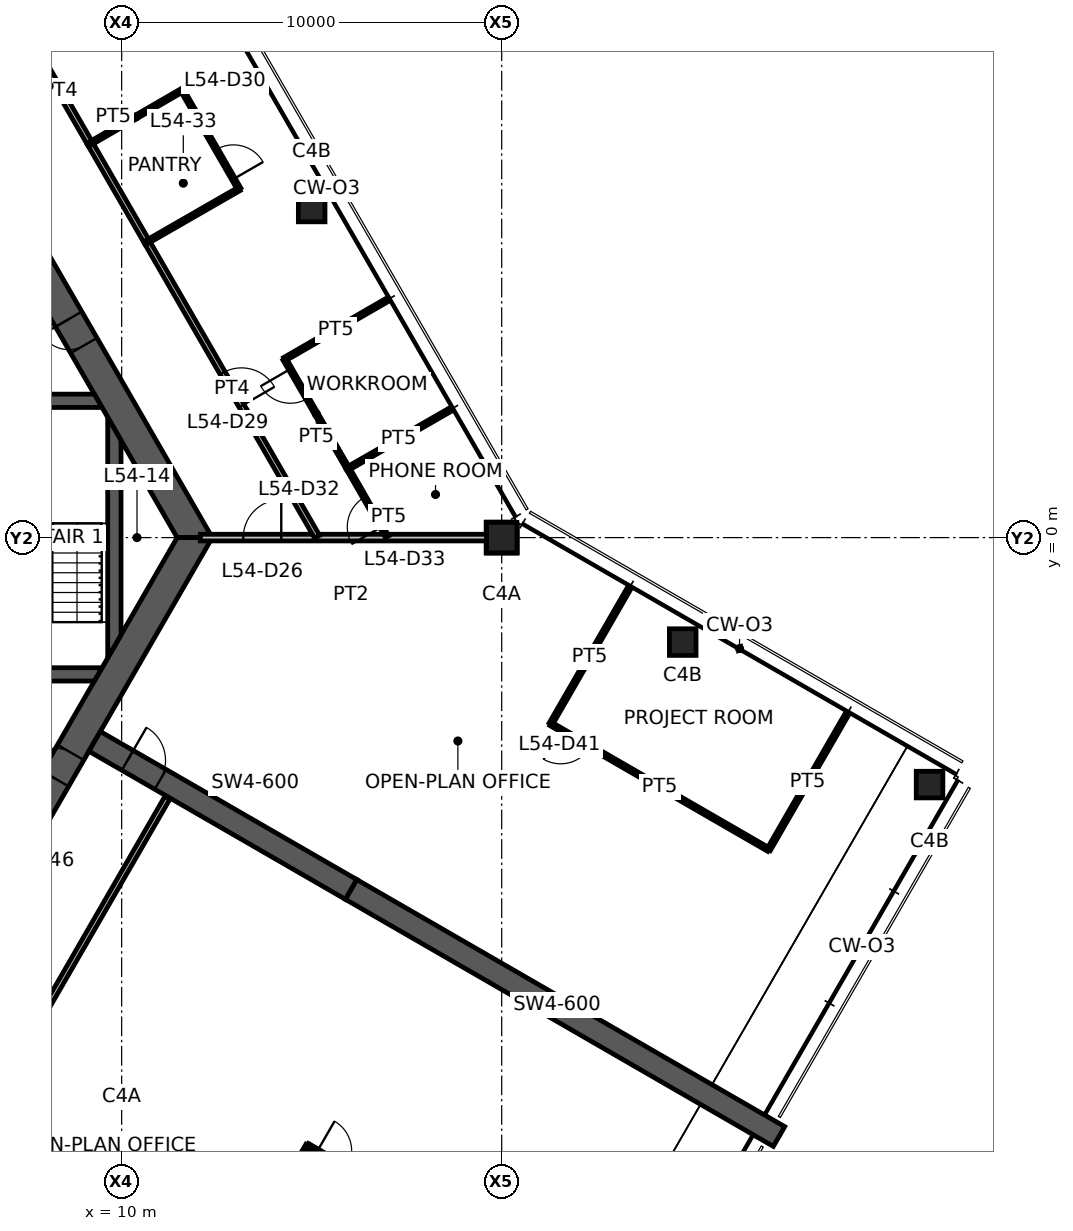
"""IFC4 building model, lengths in metres.
Left out: names, types, materials, properties, quantities, classifications, styles, units other than length and angle.
Written with IfcOpenShell. Run it as: python <this file> out.ifc"""

import sys

from ifc_helpers import new_model, si_unit, direction, frame, frame_2d, origin, origin_2d, place, context, subcontext, project, spatial, polyline, rectangle, hollow_rectangle, outline, extrude, element, fill, save


model = new_model("IFC4")
c1 = context("Model", 3, precision=1e-05, world=origin(), true_north=direction((0.0, 1.0)))
c2 = subcontext(c1, "Body", "Model", "MODEL_VIEW")
j1 = project(units=[si_unit("LENGTHUNIT", "METRE"), si_unit("PLANEANGLEUNIT", "RADIAN")], contexts=[c1])
p1 = place(None, origin())
s1 = spatial("IfcSite", under=j1, at=p1, CompositionType="ELEMENT")
p2 = place(p1, origin())
s2 = spatial("IfcBuilding", under=s1, at=p2, CompositionType="ELEMENT")
p3 = place(p2, frame((0.0, 0.0, 216.7)))
s3 = spatial("IfcBuildingStorey", under=s2, at=p3, CompositionType="ELEMENT", Elevation=216.7)
p4 = place(p3, frame((20.0, 0.0, 0.0), z_axis=(0.0, 0.0, 1.0), x_axis=(1.0, 0.0, 0.0)))
e1 = element("IfcColumn", 1, at=p4, inside=s3, PredefinedType="COLUMN", context=c2, shape_type="SweptSolid", body=[
    extrude(hollow_rectangle(XDim=0.8, YDim=0.8, WallThickness=0.04, at=origin_2d()), origin(), (0.0, 0.0, 1.0), 3.9),
])
for number, where, z_axis, x_axis in (
    (2, (15.0, 8.66, 0.0), (0.0, 0.0, 1.0), (1.0, 0.0, 0.0)),
    (3, (24.763, -2.75, 0.0), (0.0, 0.0, 1.0), (1.0, 0.0, 0.0)),
    (4, (31.258, -6.5, 0.0), (0.0, 0.0, 1.0), (1.0, 0.0, 0.0)),
):
    element("IfcColumn", number, at=place(p3, frame(where, z_axis=z_axis, x_axis=x_axis)), inside=s3, PredefinedType="COLUMN", context=c2, shape_type="SweptSolid", body=[
        extrude(hollow_rectangle(XDim=0.7, YDim=0.7, WallThickness=0.032, at=origin_2d()), origin(), (0.0, 0.0, 1.0), 3.9),
    ])
p5 = place(p3, frame((11.922, 0.0, 0.0), z_axis=(0.0, 0.0, 1.0), x_axis=(-0.500004296715, 0.866022923061, 0.0)))
e5 = element("IfcWall", 5, at=p5, inside=s3, PredefinedType="SHEAR", context=c2, shape_type="SweptSolid", body=[
    extrude(outline(polyline([(-0.231, -0.4), (5.835, -0.4), (6.635, -0.4), (12.153, -0.4), (11.691, 0.4), (6.635, 0.4), (5.835, 0.4), (0.231, 0.4), (-0.231, -0.4)])), origin(), (0.0, 0.0, 1.0), 3.9),
])
p6 = place(p5, frame((5.835, 0.0, 0.0)))
e6 = element("IfcOpeningElement", 6, at=p6, cuts=e5, PredefinedType="OPENING", context=c2, shape_type="SweptSolid", body=[
    extrude(rectangle(XDim=0.8, YDim=2.1, at=frame_2d((0.4, 1.05))), frame((0.0, 0.41, 0.0), z_axis=(0.0, -1.0, 0.0), x_axis=(1.0, 0.0, 0.0)), (0.0, 0.0, 1.0), 0.82),
])
p7 = place(p3, frame((5.961, -10.325, 0.0), z_axis=(0.0, 0.0, 1.0), x_axis=(0.500004296715, 0.866022923061, 0.0)))
e7 = element("IfcWall", 7, at=p7, inside=s3, PredefinedType="SHEAR", context=c2, shape_type="SweptSolid", body=[
    extrude(outline(polyline([(-0.231, -0.4), (4.594, -0.4), (5.394, -0.4), (12.153, -0.4), (11.691, 0.4), (5.394, 0.4), (4.594, 0.4), (0.231, 0.4), (-0.231, -0.4)])), origin(), (0.0, 0.0, 1.0), 3.9),
])
p8 = place(p7, frame((4.594, 0.0, 0.0)))
e8 = element("IfcOpeningElement", 8, at=p8, cuts=e7, PredefinedType="OPENING", context=c2, shape_type="SweptSolid", body=[
    extrude(rectangle(XDim=0.8, YDim=2.1, at=frame_2d((0.4, 1.05))), frame((0.0, 0.41, 0.0), z_axis=(0.0, -1.0, 0.0), x_axis=(1.0, 0.0, 0.0)), (0.0, 0.0, 1.0), 0.82),
])
p9 = place(p3, frame((9.288, -5.363, 0.0), z_axis=(0.0, 0.0, 1.0), x_axis=(0.866031736626, -0.499989031036, 0.0)))
e9 = element("IfcWall", 9, at=p9, inside=s3, PredefinedType="SHEAR", context=c2, shape_type="SweptSolid", body=[
    extrude(rectangle(XDim=7.796, YDim=0.6, at=frame_2d((3.898, 0.0))), origin(), (0.0, 0.0, 1.0), 3.9),
])
p10 = place(p9, frame((1.0, 0.0, 0.0)))
e10 = element("IfcOpeningElement", 10, at=p10, cuts=e9, PredefinedType="OPENING", context=c2, shape_type="SweptSolid", body=[
    extrude(rectangle(XDim=1.0, YDim=2.1, at=frame_2d((0.5, 1.05))), frame((0.0, 0.31, 0.0), z_axis=(0.0, -1.0, 0.0), x_axis=(1.0, 0.0, 0.0)), (0.0, 0.0, 1.0), 0.62),
])
p11 = place(p3, frame((16.039, -9.26, 0.0), z_axis=(0.0, 0.0, 1.0), x_axis=(0.866024837091, -0.50000098154, 0.0)))
e11 = element("IfcWall", 11, at=p11, inside=s3, PredefinedType="SHEAR", context=c2, shape_type="SweptSolid", body=[
    extrude(rectangle(XDim=13.0, YDim=0.6, at=frame_2d((6.5, 0.0))), origin(), (0.0, 0.0, 1.0), 3.9),
])
p12 = place(p3, frame((1.425, 3.6, 0.0), z_axis=(0.0, 0.0, 1.0), x_axis=(1.0, 0.0, 0.0)))
e12 = element("IfcWall", 12, at=p12, inside=s3, PredefinedType="SHEAR", context=c2, shape_type="SweptSolid", body=[
    extrude(outline(polyline([(0.0, -0.175), (1.175, -0.175), (2.075, -0.175), (3.425, -0.175), (4.725, -0.175), (8.058, -0.175), (7.856, 0.175), (4.725, 0.175), (3.425, 0.175), (2.075, 0.175), (1.175, 0.175), (0.0, 0.175), (0.0, -0.175)])), origin(), (0.0, 0.0, 1.0), 3.9),
])
p13 = place(p12, frame((1.175, 0.0, 0.0)))
e13 = element("IfcOpeningElement", 13, at=p13, cuts=e12, PredefinedType="OPENING", context=c2, shape_type="SweptSolid", body=[
    extrude(rectangle(XDim=0.9, YDim=2.1, at=frame_2d((0.45, 1.05))), frame((0.0, 0.185, 0.0), z_axis=(0.0, -1.0, 0.0), x_axis=(1.0, 0.0, 0.0)), (0.0, 0.0, 1.0), 0.37),
])
p14 = place(p12, frame((3.425, 0.0, 0.0)))
e14 = element("IfcOpeningElement", 14, at=p14, cuts=e12, PredefinedType="OPENING", context=c2, shape_type="SweptSolid", body=[
    extrude(rectangle(XDim=1.3, YDim=2.1, at=frame_2d((0.65, 1.05))), frame((0.0, 0.185, 0.0), z_axis=(0.0, -1.0, 0.0), x_axis=(1.0, 0.0, 0.0)), (0.0, 0.0, 1.0), 0.37),
])
p15 = place(p3, frame((1.425, -3.6, 0.0), z_axis=(0.0, 0.0, 1.0), x_axis=(1.0, 0.0, 0.0)))
e15 = element("IfcWall", 15, at=p15, inside=s3, PredefinedType="SHEAR", context=c2, shape_type="SweptSolid", body=[
    extrude(outline(polyline([(0.0, -0.175), (1.075, -0.175), (2.175, -0.175), (7.856, -0.175), (8.058, 0.175), (2.175, 0.175), (1.075, 0.175), (0.0, 0.175), (0.0, -0.175)])), origin(), (0.0, 0.0, 1.0), 3.9),
])
p16 = place(p15, frame((1.075, 0.0, 0.0)))
e16 = element("IfcOpeningElement", 16, at=p16, cuts=e15, PredefinedType="OPENING", context=c2, shape_type="SweptSolid", body=[
    extrude(rectangle(XDim=1.1, YDim=2.1, at=frame_2d((0.55, 1.05))), frame((0.0, 0.185, 0.0), z_axis=(0.0, -1.0, 0.0), x_axis=(1.0, 0.0, 0.0)), (0.0, 0.0, 1.0), 0.37),
])
p17 = place(p3, frame((9.808, -2.862, 0.0), z_axis=(0.0, 0.0, 1.0), x_axis=(0.0, 1.0, 0.0)))
e17 = element("IfcWall", 17, at=p17, inside=s3, PredefinedType="SHEAR", context=c2, shape_type="SweptSolid", body=[
    extrude(outline(polyline([(0.303, -0.175), (5.421, -0.175), (6.028, 0.175), (-0.303, 0.175), (0.303, -0.175)])), origin(), (0.0, 0.0, 1.0), 3.9),
])
p18 = place(p3, frame((12.07, 0.0, 0.0), z_axis=(0.0, 0.0, 1.0), x_axis=(1.0, 0.0, 0.0)))
e18 = element("IfcWall", 18, at=p18, inside=s3, PredefinedType="PARTITIONING", context=c2, shape_type="SweptSolid", body=[
    extrude(rectangle(XDim=7.93, YDim=0.175, at=frame_2d((3.965, 0.0))), origin(), (0.0, 0.0, 1.0), 3.05),
])
p19 = place(p18, frame((1.13, 0.0, 0.0)))
e19 = element("IfcOpeningElement", 19, at=p19, cuts=e18, PredefinedType="OPENING", context=c2, shape_type="SweptSolid", body=[
    extrude(rectangle(XDim=1.0, YDim=2.1, at=frame_2d((0.5, 1.05))), frame((0.0, 0.098, 0.0), z_axis=(0.0, -1.0, 0.0), x_axis=(1.0, 0.0, 0.0)), (0.0, 0.0, 1.0), 0.195),
])
p20 = place(p3, frame((9.164, 10.377, 0.0), z_axis=(0.0, 0.0, 1.0), x_axis=(0.500038395149, -0.8660032352, 0.0)))
e20 = element("IfcWall", 20, at=p20, inside=s3, PredefinedType="PARTITIONING", context=c2, shape_type="SweptSolid", body=[
    extrude(rectangle(XDim=3.01, YDim=0.15, at=frame_2d((1.505, 0.0))), origin(), (0.0, 0.0, 1.0), 2.95),
])
p21 = place(p3, frame((7.578, 13.125, 0.0), z_axis=(0.0, 0.0, 1.0), x_axis=(0.499992528944, -0.866029717158, 0.0)))
e21 = element("IfcWall", 21, at=p21, inside=s3, PredefinedType="PARTITIONING", context=c2, shape_type="SweptSolid", body=[
    extrude(rectangle(XDim=3.182, YDim=0.15, at=frame_2d((1.591, 0.0))), origin(), (0.0, 0.0, 1.0), 2.95),
])
p22 = place(p3, frame((10.664, 7.779, 0.0), z_axis=(0.0, 0.0, 1.0), x_axis=(0.49999608499, -0.866027664105, 0.0)))
e22 = element("IfcWall", 22, at=p22, inside=s3, PredefinedType="PARTITIONING", context=c2, shape_type="SweptSolid", body=[
    extrude(rectangle(XDim=8.959, YDim=0.15, at=frame_2d((4.479, 0.0))), origin(), (0.0, 0.0, 1.0), 2.95),
])
p23 = place(p22, frame((3.979, 0.0, 0.0)))
e23 = element("IfcOpeningElement", 23, at=p23, cuts=e22, PredefinedType="OPENING", context=c2, shape_type="SweptSolid", body=[
    extrude(rectangle(XDim=1.0, YDim=2.1, at=frame_2d((0.5, 1.05))), frame((0.0, 0.085, 0.0), z_axis=(0.0, -1.0, 0.0), x_axis=(1.0, 0.0, 0.0)), (0.0, 0.0, 1.0), 0.17),
])
p24 = place(p3, frame((9.169, 10.369, 0.0), z_axis=(0.0, 0.0, 1.0), x_axis=(0.865255114713, 0.501331812737, 0.0)))
e24 = element("IfcWall", 24, at=p24, inside=s3, PredefinedType="PARTITIONING", context=c2, shape_type="SweptSolid", body=[
    extrude(rectangle(XDim=2.8, YDim=0.1, at=frame_2d((1.4, 0.0))), origin(), (0.0, 0.0, 1.0), 2.95),
])
p25 = place(p3, frame((11.592, 11.773, 0.0), z_axis=(0.0, 0.0, 1.0), x_axis=(0.499990139034, -0.866031096941, 0.0)))
e25 = element("IfcWall", 25, at=p25, inside=s3, PredefinedType="PARTITIONING", context=c2, shape_type="SweptSolid", body=[
    extrude(rectangle(XDim=3.0, YDim=0.1, at=frame_2d((1.5, 0.0))), origin(), (0.0, 0.0, 1.0), 2.95),
])
p26 = place(p25, frame((1.8, 0.0, 0.0)))
e26 = element("IfcOpeningElement", 26, at=p26, cuts=e25, PredefinedType="OPENING", context=c2, shape_type="SweptSolid", body=[
    extrude(rectangle(XDim=0.9, YDim=2.1, at=frame_2d((0.45, 1.05))), frame((0.0, 0.06, 0.0), z_axis=(0.0, -1.0, 0.0), x_axis=(1.0, 0.0, 0.0)), (0.0, 0.0, 1.0), 0.12),
])
p27 = place(p3, frame((13.092, 9.175, 0.0), z_axis=(0.0, 0.0, 1.0), x_axis=(-0.866855433567, -0.498559582492, 0.0)))
e27 = element("IfcWall", 27, at=p27, inside=s3, PredefinedType="PARTITIONING", context=c2, shape_type="SweptSolid", body=[
    extrude(rectangle(XDim=2.8, YDim=0.1, at=frame_2d((1.4, 0.0))), origin(), (0.0, 0.0, 1.0), 2.95),
])
p28 = place(p3, frame((18.62, 3.351, 0.0), z_axis=(0.0, 0.0, 1.0), x_axis=(-0.866810383216, -0.498637904244, 0.0)))
e28 = element("IfcWall", 28, at=p28, inside=s3, PredefinedType="PARTITIONING", context=c2, shape_type="SweptSolid", body=[
    extrude(rectangle(XDim=3.08, YDim=0.1, at=frame_2d((1.54, 0.0))), origin(), (0.0, 0.0, 1.0), 2.95),
])
p29 = place(p3, frame((14.287, 4.695, 0.0), z_axis=(0.0, 0.0, 1.0), x_axis=(0.866036558865, 0.499980678337, 0.0)))
e29 = element("IfcWall", 29, at=p29, inside=s3, PredefinedType="PARTITIONING", context=c2, shape_type="SweptSolid", body=[
    extrude(rectangle(XDim=3.11, YDim=0.1, at=frame_2d((1.555, 0.0))), origin(), (0.0, 0.0, 1.0), 2.95),
])
p30 = place(p3, frame((15.956, 1.813, 0.0), z_axis=(0.0, 0.0, 1.0), x_axis=(-0.501111387448, 0.865382792393, 0.0)))
e30 = element("IfcWall", 30, at=p30, inside=s3, PredefinedType="PARTITIONING", context=c2, shape_type="SweptSolid", body=[
    extrude(rectangle(XDim=3.331, YDim=0.1, at=frame_2d((1.666, 0.0))), origin(), (0.0, 0.0, 1.0), 2.95),
])
p31 = place(p30, frame((2.131, 0.0, 0.0)))
e31 = element("IfcOpeningElement", 31, at=p31, cuts=e30, PredefinedType="OPENING", context=c2, shape_type="SweptSolid", body=[
    extrude(rectangle(XDim=0.9, YDim=2.1, at=frame_2d((0.45, 1.05))), frame((0.0, 0.06, 0.0), z_axis=(0.0, -1.0, 0.0), x_axis=(1.0, 0.0, 0.0)), (0.0, 0.0, 1.0), 0.12),
])
p32 = place(p3, frame((16.986, 0.02, 0.0), z_axis=(0.0, 0.0, 1.0), x_axis=(-0.498096123952, 0.867121820337, 0.0)))
e32 = element("IfcWall", 32, at=p32, inside=s3, PredefinedType="PARTITIONING", context=c2, shape_type="SweptSolid", body=[
    extrude(rectangle(XDim=2.067, YDim=0.1, at=frame_2d((1.034, 0.0))), origin(), (0.0, 0.0, 1.0), 2.95),
])
p33 = place(p32, frame((0.3, 0.0, 0.0)))
e33 = element("IfcOpeningElement", 33, at=p33, cuts=e32, PredefinedType="OPENING", context=c2, shape_type="SweptSolid", body=[
    extrude(rectangle(XDim=0.9, YDim=2.1, at=frame_2d((0.45, 1.05))), frame((0.0, 0.06, 0.0), z_axis=(0.0, -1.0, 0.0), x_axis=(1.0, 0.0, 0.0)), (0.0, 0.0, 1.0), 0.12),
])
p34 = place(p3, frame((21.292, -4.903, 0.0), z_axis=(0.0, 0.0, 1.0), x_axis=(0.500000428765, 0.866025156237, 0.0)))
e34 = element("IfcWall", 34, at=p34, inside=s3, PredefinedType="PARTITIONING", context=c2, shape_type="SweptSolid", body=[
    extrude(rectangle(XDim=4.08, YDim=0.1, at=frame_2d((2.04, 0.0))), origin(), (0.0, 0.0, 1.0), 2.95),
])
p35 = place(p3, frame((27.025, -8.213, 0.0), z_axis=(0.0, 0.0, 1.0), x_axis=(-0.866021597574, 0.500006592492, 0.0)))
e35 = element("IfcWall", 35, at=p35, inside=s3, PredefinedType="PARTITIONING", context=c2, shape_type="SweptSolid", body=[
    extrude(rectangle(XDim=6.62, YDim=0.1, at=frame_2d((3.31, 0.0))), origin(), (0.0, 0.0, 1.0), 2.95),
])
p36 = place(p35, frame((5.42, 0.0, 0.0)))
e36 = element("IfcOpeningElement", 36, at=p36, cuts=e35, PredefinedType="OPENING", context=c2, shape_type="SweptSolid", body=[
    extrude(rectangle(XDim=0.9, YDim=2.1, at=frame_2d((0.45, 1.05))), frame((0.0, 0.06, 0.0), z_axis=(0.0, -1.0, 0.0), x_axis=(1.0, 0.0, 0.0)), (0.0, 0.0, 1.0), 0.12),
])
p37 = place(p3, frame((29.08, -4.653, 0.0), z_axis=(0.0, 0.0, 1.0), x_axis=(-0.500010383074, -0.866019409031, 0.0)))
e37 = element("IfcWall", 37, at=p37, inside=s3, PredefinedType="PARTITIONING", context=c2, shape_type="SweptSolid", body=[
    extrude(rectangle(XDim=4.11, YDim=0.1, at=frame_2d((2.055, 0.0))), origin(), (0.0, 0.0, 1.0), 2.95),
])
p38 = place(p3, frame((11.207, -6.84, 0.0), z_axis=(0.0, 0.0, 1.0), x_axis=(-0.500002959843, -0.866023694911, 0.0)))
e38 = element("IfcWall", 38, at=p38, inside=s3, PredefinedType="PARTITIONING", context=c2, shape_type="SweptSolid", body=[
    extrude(rectangle(XDim=7.258, YDim=0.15, at=frame_2d((3.629, 0.0))), origin(), (0.0, 0.0, 1.0), 2.95),
])
p39 = place(p3, frame((12.837, -19.548, 0.0), z_axis=(0.0, 0.0, 1.0), x_axis=(0.499965833383, 0.866045128991, 0.0)))
e39 = element("IfcWall", 39, at=p39, inside=s3, PredefinedType="PARTITIONING", context=c2, shape_type="SweptSolid", body=[
    extrude(rectangle(XDim=4.11, YDim=0.1, at=frame_2d((2.055, 0.0))), origin(), (0.0, 0.0, 1.0), 2.95),
])
p40 = place(p3, frame((14.892, -15.988, 0.0), z_axis=(0.0, 0.0, 1.0), x_axis=(0.866030817826, -0.499990622488, 0.0)))
e40 = element("IfcWall", 40, at=p40, inside=s3, PredefinedType="PARTITIONING", context=c2, shape_type="SweptSolid", body=[
    extrude(rectangle(XDim=6.62, YDim=0.1, at=frame_2d((3.31, 0.0))), origin(), (0.0, 0.0, 1.0), 2.95),
])
p41 = place(p40, frame((0.3, 0.0, 0.0)))
e41 = element("IfcOpeningElement", 41, at=p41, cuts=e40, PredefinedType="OPENING", context=c2, shape_type="SweptSolid", body=[
    extrude(rectangle(XDim=0.9, YDim=2.1, at=frame_2d((0.45, 1.05))), frame((0.0, 0.06, 0.0), z_axis=(0.0, -1.0, 0.0), x_axis=(1.0, 0.0, 0.0)), (0.0, 0.0, 1.0), 0.12),
])
p42 = place(p6, origin())
e42 = element("IfcDoor", 42, at=p42, inside=s3, OperationType="SINGLE_SWING_RIGHT", PredefinedType="DOOR", context=c2, shape_type="SweptSolid", body=[
    extrude(rectangle(XDim=0.8, YDim=2.1, at=frame_2d((0.4, 1.05))), frame((0.0, 0.025, 0.0), z_axis=(0.0, -1.0, 0.0), x_axis=(1.0, 0.0, 0.0)), (0.0, 0.0, 1.0), 0.05),
])
fill(e6, e42)
p43 = place(p8, origin())
e43 = element("IfcDoor", 43, at=p43, inside=s3, OperationType="SINGLE_SWING_LEFT", PredefinedType="DOOR", context=c2, shape_type="SweptSolid", body=[
    extrude(rectangle(XDim=0.8, YDim=2.1, at=frame_2d((0.4, 1.05))), frame((0.0, 0.025, 0.0), z_axis=(0.0, -1.0, 0.0), x_axis=(1.0, 0.0, 0.0)), (0.0, 0.0, 1.0), 0.05),
])
fill(e8, e43)
p44 = place(p10, origin())
e44 = element("IfcDoor", 44, at=p44, inside=s3, OperationType="SINGLE_SWING_LEFT", PredefinedType="DOOR", context=c2, shape_type="SweptSolid", body=[
    extrude(rectangle(XDim=1.0, YDim=2.1, at=frame_2d((0.5, 1.05))), frame((0.0, 0.025, 0.0), z_axis=(0.0, -1.0, 0.0), x_axis=(1.0, 0.0, 0.0)), (0.0, 0.0, 1.0), 0.05),
])
fill(e10, e44)
p45 = place(p19, origin())
e45 = element("IfcDoor", 45, at=p45, inside=s3, OperationType="SINGLE_SWING_RIGHT", PredefinedType="DOOR", context=c2, shape_type="SweptSolid", body=[
    extrude(rectangle(XDim=1.0, YDim=2.1, at=frame_2d((0.5, 1.05))), frame((0.0, 0.025, 0.0), z_axis=(0.0, -1.0, 0.0), x_axis=(1.0, 0.0, 0.0)), (0.0, 0.0, 1.0), 0.05),
])
fill(e19, e45)
p46 = place(p23, origin())
e46 = element("IfcDoor", 46, at=p46, inside=s3, OperationType="SINGLE_SWING_RIGHT", PredefinedType="DOOR", context=c2, shape_type="SweptSolid", body=[
    extrude(rectangle(XDim=1.0, YDim=2.1, at=frame_2d((0.5, 1.05))), frame((0.0, 0.025, 0.0), z_axis=(0.0, -1.0, 0.0), x_axis=(1.0, 0.0, 0.0)), (0.0, 0.0, 1.0), 0.05),
])
fill(e23, e46)
p47 = place(p26, origin())
e47 = element("IfcDoor", 47, at=p47, inside=s3, OperationType="SINGLE_SWING_RIGHT", PredefinedType="DOOR", context=c2, shape_type="SweptSolid", body=[
    extrude(rectangle(XDim=0.9, YDim=2.1, at=frame_2d((0.45, 1.05))), frame((0.0, 0.025, 0.0), z_axis=(0.0, -1.0, 0.0), x_axis=(1.0, 0.0, 0.0)), (0.0, 0.0, 1.0), 0.05),
])
fill(e26, e47)
p48 = place(p31, origin())
e48 = element("IfcDoor", 48, at=p48, inside=s3, OperationType="SINGLE_SWING_RIGHT", PredefinedType="DOOR", context=c2, shape_type="SweptSolid", body=[
    extrude(rectangle(XDim=0.9, YDim=2.1, at=frame_2d((0.45, 1.05))), frame((0.0, 0.025, 0.0), z_axis=(0.0, -1.0, 0.0), x_axis=(1.0, 0.0, 0.0)), (0.0, 0.0, 1.0), 0.05),
])
fill(e31, e48)
p49 = place(p33, origin())
e49 = element("IfcDoor", 49, at=p49, inside=s3, OperationType="SINGLE_SWING_LEFT", PredefinedType="DOOR", context=c2, shape_type="SweptSolid", body=[
    extrude(rectangle(XDim=0.9, YDim=2.1, at=frame_2d((0.45, 1.05))), frame((0.0, 0.025, 0.0), z_axis=(0.0, -1.0, 0.0), x_axis=(1.0, 0.0, 0.0)), (0.0, 0.0, 1.0), 0.05),
])
fill(e33, e49)
p50 = place(p36, origin())
e50 = element("IfcDoor", 50, at=p50, inside=s3, OperationType="SINGLE_SWING_RIGHT", PredefinedType="DOOR", context=c2, shape_type="SweptSolid", body=[
    extrude(rectangle(XDim=0.9, YDim=2.1, at=frame_2d((0.45, 1.05))), frame((0.0, 0.025, 0.0), z_axis=(0.0, -1.0, 0.0), x_axis=(1.0, 0.0, 0.0)), (0.0, 0.0, 1.0), 0.05),
])
fill(e36, e50)
p51 = place(p41, origin())
e51 = element("IfcDoor", 51, at=p51, inside=s3, OperationType="SINGLE_SWING_LEFT", PredefinedType="DOOR", context=c2, shape_type="SweptSolid", body=[
    extrude(rectangle(XDim=0.9, YDim=2.1, at=frame_2d((0.45, 1.05))), frame((0.0, 0.025, 0.0), z_axis=(0.0, -1.0, 0.0), x_axis=(1.0, 0.0, 0.0)), (0.0, 0.0, 1.0), 0.05),
])
fill(e41, e51)
save(model, sys.argv[1])
